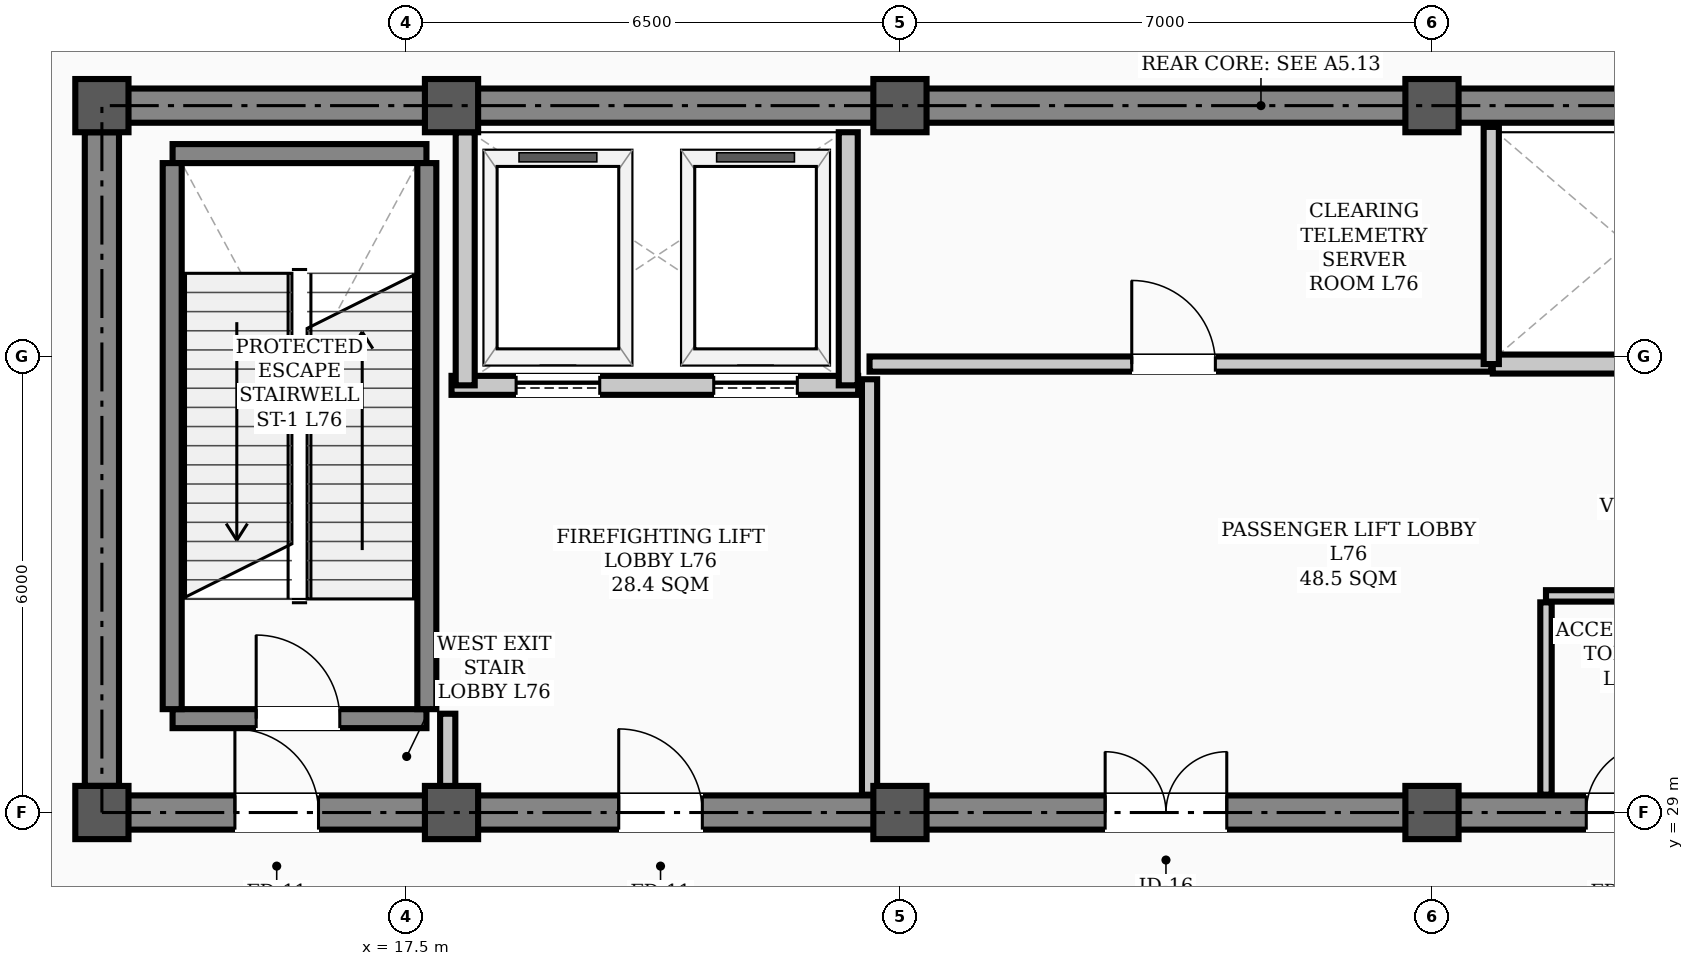
"""IFC4 building model, lengths in metres.
Left out: names, types, materials, properties, quantities, classifications, styles, units other than length and angle.
Written with IfcOpenShell. Run it as: python <this file> out.ifc"""

import sys

from ifc_helpers import new_model, si_unit, direction, frame, frame_2d, origin, origin_2d, place, context, subcontext, project, spatial, rectangle, hollow_rectangle, extrude, element, fill, save


model = new_model("IFC4")
c1 = context("Model", 3, precision=1e-05, world=origin(), true_north=direction((0.0, 1.0)))
c2 = subcontext(c1, "Body", "Model", "MODEL_VIEW")
j1 = project(units=[si_unit("LENGTHUNIT", "METRE"), si_unit("PLANEANGLEUNIT", "RADIAN")], contexts=[c1])
p1 = place(None, origin())
s1 = spatial("IfcSite", under=j1, at=p1, CompositionType="ELEMENT")
p2 = place(p1, origin())
s2 = spatial("IfcBuilding", under=s1, at=p2, CompositionType="ELEMENT")
p3 = place(p2, frame((0.0, 0.0, 306.0)))
s3 = spatial("IfcBuildingStorey", under=s2, at=p3, CompositionType="ELEMENT", Elevation=306.0)
for number, where, z_axis, x_axis in (
    (1, (13.5, 29.0, 0.0), (0.0, 0.0, 1.0), (1.0, 0.0, 0.0)),
    (2, (13.5, 38.3, 0.0), (0.0, 0.0, 1.0), (1.0, 0.0, 0.0)),
    (3, (18.1, 29.0, 0.0), (0.0, 0.0, 1.0), (1.0, 0.0, 0.0)),
    (4, (18.1, 38.3, 0.0), (0.0, 0.0, 1.0), (1.0, 0.0, 0.0)),
    (5, (24.0, 29.0, 0.0), (0.0, 0.0, 1.0), (1.0, 0.0, 0.0)),
    (6, (24.0, 38.3, 0.0), (0.0, 0.0, 1.0), (1.0, 0.0, 0.0)),
    (7, (31.0, 29.0, 0.0), (0.0, 0.0, 1.0), (1.0, 0.0, 0.0)),
    (8, (31.0, 38.3, 0.0), (0.0, 0.0, 1.0), (1.0, 0.0, 0.0)),
):
    element("IfcColumn", number, at=place(p3, frame(where, z_axis=z_axis, x_axis=x_axis)), inside=s3, PredefinedType="COLUMN", context=c2, shape_type="SweptSolid", body=[
        extrude(hollow_rectangle(XDim=0.7, YDim=0.7, WallThickness=0.028, InnerFilletRadius=0.014, OuterFilletRadius=0.042, at=origin_2d()), origin(), (0.0, 0.0, 1.0), 6.6),
    ])
p4 = place(p3, frame((13.5, 29.0, 0.0), z_axis=(0.0, 0.0, 1.0), x_axis=(1.0, 0.0, 0.0)))
e9 = element("IfcWall", 9, at=p4, inside=s3, PredefinedType="SHEAR", context=c2, shape_type="SweptSolid", body=[
    extrude(rectangle(XDim=30.5, YDim=0.45, at=frame_2d((15.25, 0.0))), origin(), (0.0, 0.0, 1.0), 6.34),
])
p5 = place(p4, frame((1.75, 0.0, 0.0)))
e10 = element("IfcOpeningElement", 10, at=p5, cuts=e9, PredefinedType="OPENING", context=c2, shape_type="SweptSolid", body=[
    extrude(rectangle(XDim=1.1, YDim=2.08, at=frame_2d((0.55, 1.04))), frame((0.0, 0.235, 0.0), z_axis=(0.0, -1.0, 0.0), x_axis=(1.0, 0.0, 0.0)), (0.0, 0.0, 1.0), 0.47),
])
p6 = place(p4, frame((26.7, 0.0, 0.0)))
e11 = element("IfcOpeningElement", 11, at=p6, cuts=e9, PredefinedType="OPENING", context=c2, shape_type="SweptSolid", body=[
    extrude(rectangle(XDim=1.1, YDim=2.08, at=frame_2d((0.55, 1.04))), frame((0.0, 0.235, 0.0), z_axis=(0.0, -1.0, 0.0), x_axis=(1.0, 0.0, 0.0)), (0.0, 0.0, 1.0), 0.47),
])
p7 = place(p4, frame((6.8, 0.0, 0.0)))
e12 = element("IfcOpeningElement", 12, at=p7, cuts=e9, PredefinedType="OPENING", context=c2, shape_type="SweptSolid", body=[
    extrude(rectangle(XDim=1.1, YDim=2.08, at=frame_2d((0.55, 1.04))), frame((0.0, 0.235, 0.0), z_axis=(0.0, -1.0, 0.0), x_axis=(1.0, 0.0, 0.0)), (0.0, 0.0, 1.0), 0.47),
])
p8 = place(p4, frame((13.2, 0.0, 0.0)))
e13 = element("IfcOpeningElement", 13, at=p8, cuts=e9, PredefinedType="OPENING", context=c2, shape_type="SweptSolid", body=[
    extrude(rectangle(XDim=1.6, YDim=2.08, at=frame_2d((0.8, 1.04))), frame((0.0, 0.235, 0.0), z_axis=(0.0, -1.0, 0.0), x_axis=(1.0, 0.0, 0.0)), (0.0, 0.0, 1.0), 0.47),
])
p9 = place(p4, frame((19.53, 0.0, 0.0)))
e14 = element("IfcOpeningElement", 14, at=p9, cuts=e9, PredefinedType="OPENING", context=c2, shape_type="SweptSolid", body=[
    extrude(rectangle(XDim=0.9, YDim=2.08, at=frame_2d((0.45, 1.04))), frame((0.0, 0.235, 0.0), z_axis=(0.0, -1.0, 0.0), x_axis=(1.0, 0.0, 0.0)), (0.0, 0.0, 1.0), 0.47),
])
p10 = place(p4, frame((21.57, 0.0, 0.0)))
e15 = element("IfcOpeningElement", 15, at=p10, cuts=e9, PredefinedType="OPENING", context=c2, shape_type="SweptSolid", body=[
    extrude(rectangle(XDim=0.9, YDim=2.08, at=frame_2d((0.45, 1.04))), frame((0.0, 0.235, 0.0), z_axis=(0.0, -1.0, 0.0), x_axis=(1.0, 0.0, 0.0)), (0.0, 0.0, 1.0), 0.47),
])
p11 = place(p3, frame((13.5, 38.3, 0.0), z_axis=(0.0, 0.0, 1.0), x_axis=(1.0, 0.0, 0.0)))
e16 = element("IfcWall", 16, at=p11, inside=s3, PredefinedType="SHEAR", context=c2, shape_type="SweptSolid", body=[
    extrude(rectangle(XDim=30.5, YDim=0.45, at=frame_2d((15.25, 0.0))), origin(), (0.0, 0.0, 1.0), 6.34),
])
p12 = place(p3, frame((13.5, 29.35, 0.0), z_axis=(0.0, 0.0, 1.0), x_axis=(0.0, 1.0, 0.0)))
e17 = element("IfcWall", 17, at=p12, inside=s3, PredefinedType="SHEAR", context=c2, shape_type="SweptSolid", body=[
    extrude(rectangle(XDim=8.6, YDim=0.45, at=frame_2d((4.3, 0.0))), origin(), (0.0, 0.0, 1.0), 6.34),
])
p13 = place(p3, frame((14.43, 30.235, 0.0), z_axis=(0.0, 0.0, 1.0), x_axis=(1.0, 0.0, 0.0)))
e18 = element("IfcWall", 18, at=p13, inside=s3, PredefinedType="STANDARD", context=c2, shape_type="SweptSolid", body=[
    extrude(rectangle(XDim=3.34, YDim=0.25, at=frame_2d((1.67, 0.0))), origin(), (0.0, 0.0, 1.0), 6.34),
])
p14 = place(p13, frame((1.1, 0.0, 0.0)))
e19 = element("IfcOpeningElement", 19, at=p14, cuts=e18, PredefinedType="OPENING", context=c2, shape_type="SweptSolid", body=[
    extrude(rectangle(XDim=1.1, YDim=2.08, at=frame_2d((0.55, 1.04))), frame((0.0, 0.135, 0.0), z_axis=(0.0, -1.0, 0.0), x_axis=(1.0, 0.0, 0.0)), (0.0, 0.0, 1.0), 0.27),
])
p15 = place(p3, frame((14.43, 37.669, 0.0), z_axis=(0.0, 0.0, 1.0), x_axis=(1.0, 0.0, 0.0)))
e20 = element("IfcWall", 20, at=p15, inside=s3, PredefinedType="STANDARD", context=c2, shape_type="SweptSolid", body=[
    extrude(rectangle(XDim=3.34, YDim=0.25, at=frame_2d((1.67, 0.0))), origin(), (0.0, 0.0, 1.0), 6.34),
])
for number, where, z_axis, x_axis in (
    (21, (14.425, 30.36, 0.0), (0.0, 0.0, 1.0), (0.0, 1.0, 0.0)),
    (22, (17.775, 30.36, 0.0), (0.0, 0.0, 1.0), (0.0, 1.0, 0.0)),
):
    element("IfcWall", number, at=place(p3, frame(where, z_axis=z_axis, x_axis=x_axis)), inside=s3, PredefinedType="STANDARD", context=c2, shape_type="SweptSolid", body=[
        extrude(rectangle(XDim=7.184, YDim=0.25, at=frame_2d((3.592, 0.0))), origin(), (0.0, 0.0, 1.0), 6.34),
    ])
p16 = place(p3, frame((18.1, 34.62, 0.0), z_axis=(0.0, 0.0, 1.0), x_axis=(1.0, 0.0, 0.0)))
e23 = element("IfcWall", 23, at=p16, inside=s3, PredefinedType="STANDARD", context=c2, shape_type="SweptSolid", body=[
    extrude(rectangle(XDim=5.35, YDim=0.25, at=frame_2d((2.675, 0.0))), origin(), (0.0, 0.0, 1.0), 6.34),
])
p17 = place(p16, frame((0.85, 0.0, 0.0)))
e24 = element("IfcOpeningElement", 24, at=p17, cuts=e23, PredefinedType="OPENING", context=c2, shape_type="SweptSolid", body=[
    extrude(rectangle(XDim=1.1, YDim=2.08, at=frame_2d((0.55, 1.04))), frame((0.0, 0.135, 0.0), z_axis=(0.0, -1.0, 0.0), x_axis=(1.0, 0.0, 0.0)), (0.0, 0.0, 1.0), 0.27),
])
p18 = place(p16, frame((3.45, 0.0, 0.0)))
e25 = element("IfcOpeningElement", 25, at=p18, cuts=e23, PredefinedType="OPENING", context=c2, shape_type="SweptSolid", body=[
    extrude(rectangle(XDim=1.1, YDim=2.08, at=frame_2d((0.55, 1.04))), frame((0.0, 0.135, 0.0), z_axis=(0.0, -1.0, 0.0), x_axis=(1.0, 0.0, 0.0)), (0.0, 0.0, 1.0), 0.27),
])
for number, where, z_axis, x_axis in (
    (26, (18.28, 34.62, 0.0), (0.0, 0.0, 1.0), (0.0, 1.0, 0.0)),
    (27, (23.32, 34.62, 0.0), (0.0, 0.0, 1.0), (0.0, 1.0, 0.0)),
):
    element("IfcWall", number, at=place(p3, frame(where, z_axis=z_axis, x_axis=x_axis)), inside=s3, PredefinedType="STANDARD", context=c2, shape_type="SweptSolid", body=[
        extrude(rectangle(XDim=3.33, YDim=0.25, at=frame_2d((1.665, 0.0))), origin(), (0.0, 0.0, 1.0), 6.34),
    ])
p19 = place(p3, frame((31.8, 34.9, 0.0), z_axis=(0.0, 0.0, 1.0), x_axis=(1.0, 0.0, 0.0)))
e28 = element("IfcWall", 28, at=p19, inside=s3, PredefinedType="STANDARD", context=c2, shape_type="SweptSolid", body=[
    extrude(rectangle(XDim=3.6, YDim=0.25, at=frame_2d((1.8, 0.0))), origin(), (0.0, 0.0, 1.0), 6.34),
])
p20 = place(p3, frame((23.6, 34.9, 0.0), z_axis=(0.0, 0.0, 1.0), x_axis=(1.0, 0.0, 0.0)))
e29 = element("IfcWall", 29, at=p20, inside=s3, PredefinedType="STANDARD", context=c2, shape_type="SweptSolid", body=[
    extrude(rectangle(XDim=8.18, YDim=0.2, at=frame_2d((4.09, 0.0))), origin(), (0.0, 0.0, 1.0), 6.34),
])
p21 = place(p20, frame((3.45, 0.0, 0.0)))
e30 = element("IfcOpeningElement", 30, at=p21, cuts=e29, PredefinedType="OPENING", context=c2, shape_type="SweptSolid", body=[
    extrude(rectangle(XDim=1.1, YDim=2.08, at=frame_2d((0.55, 1.04))), frame((0.0, 0.11, 0.0), z_axis=(0.0, -1.0, 0.0), x_axis=(1.0, 0.0, 0.0)), (0.0, 0.0, 1.0), 0.22),
])
p22 = place(p3, frame((32.5, 31.85, 0.0), z_axis=(0.0, 0.0, 1.0), x_axis=(1.0, 0.0, 0.0)))
e31 = element("IfcWall", 31, at=p22, inside=s3, PredefinedType="PARTITIONING", context=c2, shape_type="SweptSolid", body=[
    extrude(rectangle(XDim=4.1, YDim=0.15, at=frame_2d((2.05, 0.0))), origin(), (0.0, 0.0, 1.0), 6.34),
])
p23 = place(p3, frame((18.05, 29.235, 0.0), z_axis=(0.0, 0.0, 1.0), x_axis=(0.0, 1.0, 0.0)))
e32 = element("IfcWall", 32, at=p23, inside=s3, PredefinedType="STANDARD", context=c2, shape_type="SweptSolid", body=[
    extrude(rectangle(XDim=1.065, YDim=0.2, at=frame_2d((0.532, 0.0))), origin(), (0.0, 0.0, 1.0), 6.34),
])
p24 = place(p3, frame((23.6, 29.235, 0.0), z_axis=(0.0, 0.0, 1.0), x_axis=(0.0, 1.0, 0.0)))
e33 = element("IfcWall", 33, at=p24, inside=s3, PredefinedType="STANDARD", context=c2, shape_type="SweptSolid", body=[
    extrude(rectangle(XDim=5.465, YDim=0.2, at=frame_2d((2.732, 0.0))), origin(), (0.0, 0.0, 1.0), 2.43),
])
p25 = place(p3, frame((32.5, 29.235, 0.0), z_axis=(0.0, 0.0, 1.0), x_axis=(0.0, 1.0, 0.0)))
e34 = element("IfcWall", 34, at=p25, inside=s3, PredefinedType="PARTITIONING", context=c2, shape_type="SweptSolid", body=[
    extrude(rectangle(XDim=2.53, YDim=0.15, at=frame_2d((1.265, 0.0))), origin(), (0.0, 0.0, 1.0), 6.02),
])
p26 = place(p3, frame((31.78, 34.9, 0.0), z_axis=(0.0, 0.0, 1.0), x_axis=(0.0, 1.0, 0.0)))
e35 = element("IfcWall", 35, at=p26, inside=s3, PredefinedType="STANDARD", context=c2, shape_type="SweptSolid", body=[
    extrude(rectangle(XDim=3.12, YDim=0.2, at=frame_2d((1.56, 0.0))), origin(), (0.0, 0.0, 1.0), 6.02),
])
p27 = place(p14, origin())
e36 = element("IfcDoor", 36, at=p27, inside=s3, OperationType="SINGLE_SWING_LEFT", PredefinedType="DOOR", context=c2, shape_type="SweptSolid", body=[
    extrude(rectangle(XDim=1.1, YDim=2.08, at=frame_2d((0.55, 1.04))), frame((0.0, 0.025, 0.0), z_axis=(0.0, -1.0, 0.0), x_axis=(1.0, 0.0, 0.0)), (0.0, 0.0, 1.0), 0.05),
])
fill(e19, e36)
p28 = place(p5, origin())
e37 = element("IfcDoor", 37, at=p28, inside=s3, OperationType="SINGLE_SWING_LEFT", PredefinedType="DOOR", context=c2, shape_type="SweptSolid", body=[
    extrude(rectangle(XDim=1.1, YDim=2.08, at=frame_2d((0.55, 1.04))), frame((0.0, 0.025, 0.0), z_axis=(0.0, -1.0, 0.0), x_axis=(1.0, 0.0, 0.0)), (0.0, 0.0, 1.0), 0.05),
])
fill(e10, e37)
p29 = place(p7, origin())
e38 = element("IfcDoor", 38, at=p29, inside=s3, OperationType="SINGLE_SWING_LEFT", PredefinedType="DOOR", context=c2, shape_type="SweptSolid", body=[
    extrude(rectangle(XDim=1.1, YDim=2.08, at=frame_2d((0.55, 1.04))), frame((0.0, 0.025, 0.0), z_axis=(0.0, -1.0, 0.0), x_axis=(1.0, 0.0, 0.0)), (0.0, 0.0, 1.0), 0.05),
])
fill(e12, e38)
p30 = place(p8, origin())
e39 = element("IfcDoor", 39, at=p30, inside=s3, OperationType="DOUBLE_DOOR_SINGLE_SWING", PredefinedType="DOOR", context=c2, shape_type="SweptSolid", body=[
    extrude(rectangle(XDim=1.6, YDim=2.08, at=frame_2d((0.8, 1.04))), frame((0.0, 0.025, 0.0), z_axis=(0.0, -1.0, 0.0), x_axis=(1.0, 0.0, 0.0)), (0.0, 0.0, 1.0), 0.05),
])
fill(e13, e39)
p31 = place(p21, origin())
e40 = element("IfcDoor", 40, at=p31, inside=s3, OperationType="SINGLE_SWING_LEFT", PredefinedType="DOOR", context=c2, shape_type="SweptSolid", body=[
    extrude(rectangle(XDim=1.1, YDim=2.08, at=frame_2d((0.55, 1.04))), frame((0.0, 0.025, 0.0), z_axis=(0.0, -1.0, 0.0), x_axis=(1.0, 0.0, 0.0)), (0.0, 0.0, 1.0), 0.05),
])
fill(e30, e40)
p32 = place(p9, origin())
e41 = element("IfcDoor", 41, at=p32, inside=s3, OperationType="SINGLE_SWING_RIGHT", PredefinedType="DOOR", context=c2, shape_type="SweptSolid", body=[
    extrude(rectangle(XDim=0.9, YDim=2.08, at=frame_2d((0.45, 1.04))), frame((0.0, 0.025, 0.0), z_axis=(0.0, -1.0, 0.0), x_axis=(1.0, 0.0, 0.0)), (0.0, 0.0, 1.0), 0.05),
])
fill(e14, e41)
p33 = place(p17, origin())
e42 = element("IfcDoor", 42, at=p33, inside=s3, OperationType="SLIDING_TO_LEFT", PredefinedType="DOOR", context=c2, shape_type="SweptSolid", body=[
    extrude(rectangle(XDim=1.1, YDim=2.08, at=frame_2d((0.55, 1.04))), frame((0.0, 0.025, 0.0), z_axis=(0.0, -1.0, 0.0), x_axis=(1.0, 0.0, 0.0)), (0.0, 0.0, 1.0), 0.05),
])
fill(e24, e42)
p34 = place(p18, origin())
e43 = element("IfcDoor", 43, at=p34, inside=s3, OperationType="SLIDING_TO_LEFT", PredefinedType="DOOR", context=c2, shape_type="SweptSolid", body=[
    extrude(rectangle(XDim=1.1, YDim=2.08, at=frame_2d((0.55, 1.04))), frame((0.0, 0.025, 0.0), z_axis=(0.0, -1.0, 0.0), x_axis=(1.0, 0.0, 0.0)), (0.0, 0.0, 1.0), 0.05),
])
fill(e25, e43)
save(model, sys.argv[1])
